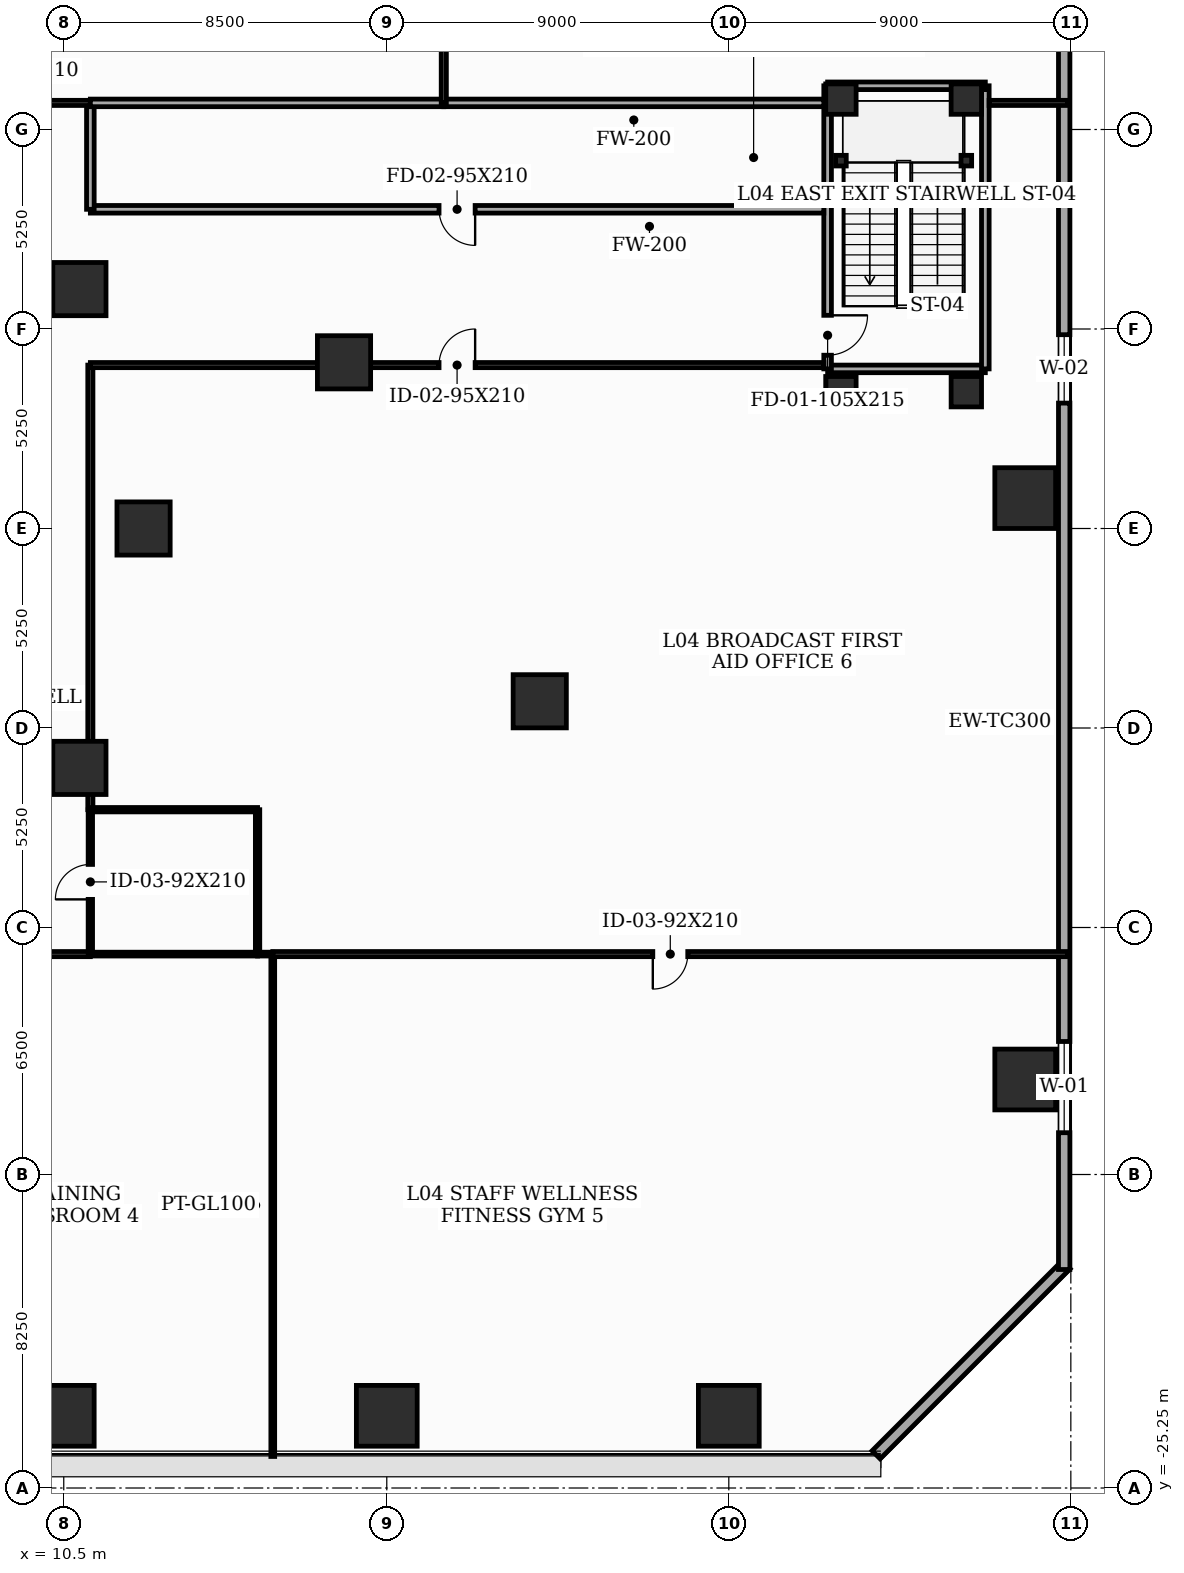
"""IFC4 building model, lengths in metres.
Left out: names, types, materials, properties, quantities, classifications, styles, units other than length and angle.
Written with IfcOpenShell. Run it as: python <this file> out.ifc"""

import sys

from ifc_helpers import new_model, si_unit, direction, frame, frame_2d, origin, origin_2d, place, context, subcontext, project, spatial, rectangle, i_section, extrude, element, fill, save


model = new_model("IFC4")
c1 = context("Model", 3, precision=1e-05, world=origin(), true_north=direction((0.0, 1.0)))
c2 = subcontext(c1, "Body", "Model", "MODEL_VIEW")
j1 = project(units=[si_unit("LENGTHUNIT", "METRE"), si_unit("PLANEANGLEUNIT", "RADIAN")], contexts=[c1])
p1 = place(None, origin())
s1 = spatial("IfcSite", under=j1, at=p1, CompositionType="ELEMENT")
p2 = place(p1, origin())
s2 = spatial("IfcBuilding", under=s1, at=p2, CompositionType="ELEMENT")
p3 = place(p2, frame((0.0, 0.0, 20.8)))
s3 = spatial("IfcBuildingStorey", under=s2, at=p3, CompositionType="ELEMENT", Elevation=20.8)
for number, where, z_axis, x_axis in (
    (1, (12.6, 0.0, 0.0), (0.0, 0.0, 1.0), (1.0, 0.0, 0.0)),
    (2, (10.912, 6.3, 0.0), (0.0, 0.0, 1.0), (1.0, 0.0, 0.0)),
    (3, (10.912, -6.3, 0.0), (0.0, 0.0, 1.0), (1.0, 0.0, 0.0)),
):
    element("IfcColumn", number, at=place(p3, frame(where, z_axis=z_axis, x_axis=x_axis)), inside=s3, PredefinedType="COLUMN", context=c2, shape_type="SweptSolid", body=[
        extrude(rectangle(XDim=1.4, YDim=1.4, at=origin_2d()), origin(), (0.0, 0.0, 1.0), 5.2),
    ])
for number, where, z_axis, x_axis in (
    (4, (10.5, -23.35, 0.0), (0.0, 0.0, 1.0), (1.0, 0.0, 0.0)),
    (5, (19.0, -23.35, 0.0), (0.0, 0.0, 1.0), (1.0, 0.0, 0.0)),
    (6, (28.0, -23.35, 0.0), (0.0, 0.0, 1.0), (1.0, 0.0, 0.0)),
    (7, (35.8, -14.5, 0.0), (0.0, 0.0, 1.0), (1.0, 0.0, 0.0)),
    (8, (35.8, 0.8, 0.0), (0.0, 0.0, 1.0), (1.0, 0.0, 0.0)),
):
    element("IfcColumn", number, at=place(p3, frame(where, z_axis=z_axis, x_axis=x_axis)), inside=s3, PredefinedType="COLUMN", context=c2, shape_type="SweptSolid", body=[
        extrude(rectangle(XDim=1.6, YDim=1.6, at=origin_2d()), origin(), (0.0, 0.0, 1.0), 5.2),
    ])
for number, where, z_axis, x_axis in (
    (9, (23.025, -4.547, 0.0), (0.0, 0.0, 1.0), (1.0, 0.0, 0.0)),
    (10, (17.875, 4.373, 0.0), (0.0, 0.0, 1.0), (1.0, 0.0, 0.0)),
):
    element("IfcColumn", number, at=place(p3, frame(where, z_axis=z_axis, x_axis=x_axis)), inside=s3, PredefinedType="COLUMN", context=c2, shape_type="SweptSolid", body=[
        extrude(rectangle(XDim=1.4, YDim=1.4, at=origin_2d()), origin(), (0.0, 0.0, 1.0), 5.2),
    ])
for number, where, z_axis, x_axis in (
    (11, (30.95, 3.6, 0.0), (0.0, 0.0, 1.0), (1.0, 0.0, 0.0)),
    (12, (34.25, 3.6, 0.0), (0.0, 0.0, 1.0), (1.0, 0.0, 0.0)),
    (13, (34.25, 11.3, 0.0), (0.0, 0.0, 1.0), (1.0, 0.0, 0.0)),
    (14, (30.95, 11.3, 0.0), (0.0, 0.0, 1.0), (1.0, 0.0, 0.0)),
):
    element("IfcColumn", number, at=place(p3, frame(where, z_axis=z_axis, x_axis=x_axis)), inside=s3, PredefinedType="COLUMN", context=c2, shape_type="SweptSolid", body=[
        extrude(rectangle(XDim=0.8, YDim=0.8, at=origin_2d()), origin(), (0.0, 0.0, 1.0), 5.2),
    ])
for number, where, z_axis, x_axis in (
    (15, (30.95, 9.68, 0.0), (0.0, 0.0, 1.0), (1.0, 0.0, 0.0)),
    (16, (34.25, 9.68, 0.0), (0.0, 0.0, 1.0), (1.0, 0.0, 0.0)),
):
    element("IfcColumn", number, at=place(p3, frame(where, z_axis=z_axis, x_axis=x_axis)), inside=s3, PredefinedType="PILASTER", context=c2, shape_type="SweptSolid", body=[
        extrude(i_section(OverallWidth=0.28, OverallDepth=0.28, WebThickness=0.01, FlangeThickness=0.018, at=origin_2d()), origin(), (0.0, 0.0, 1.0), 5.2),
    ])
p4 = place(p3, frame((31.876, -24.376, 0.0), z_axis=(0.0, 0.0, 1.0), x_axis=(0.707106781187, 0.707106781187, 0.0)))
e17 = element("IfcWall", 17, at=p4, inside=s3, PredefinedType="SOLIDWALL", context=c2, shape_type="SweptSolid", body=[
    extrude(rectangle(XDim=7.071, YDim=0.3, at=frame_2d((3.536, 0.0))), origin(), (0.0, 0.0, 1.0), 4.94),
])
p5 = place(p3, frame((36.825, -19.5, 0.0), z_axis=(0.0, 0.0, 1.0), x_axis=(0.0, 1.0, 0.0)))
e18 = element("IfcWall", 18, at=p5, inside=s3, PredefinedType="SOLIDWALL", context=c2, shape_type="SweptSolid", body=[
    extrude(rectangle(XDim=48.0, YDim=0.3, at=frame_2d((24.0, 0.0))), origin(), (0.0, 0.0, 1.0), 4.94),
])
p6 = place(p5, frame((3.6, 0.0, 0.9)))
e19 = element("IfcOpeningElement", 19, at=p6, cuts=e18, PredefinedType="OPENING", context=c2, shape_type="SweptSolid", body=[
    extrude(rectangle(XDim=2.4, YDim=1.35, at=frame_2d((1.2, 0.675))), frame((0.0, 0.16, 0.0), z_axis=(0.0, -1.0, 0.0), x_axis=(1.0, 0.0, 0.0)), (0.0, 0.0, 1.0), 0.32),
])
p7 = place(p5, frame((22.8, 0.0, 0.9)))
e20 = element("IfcOpeningElement", 20, at=p7, cuts=e18, PredefinedType="OPENING", context=c2, shape_type="SweptSolid", body=[
    extrude(rectangle(XDim=1.8, YDim=1.35, at=frame_2d((0.9, 0.675))), frame((0.0, 0.16, 0.0), z_axis=(0.0, -1.0, 0.0), x_axis=(1.0, 0.0, 0.0)), (0.0, 0.0, 1.0), 0.32),
])
p8 = place(p5, frame((33.8, 0.0, 0.9)))
e21 = element("IfcOpeningElement", 21, at=p8, cuts=e18, PredefinedType="OPENING", context=c2, shape_type="SweptSolid", body=[
    extrude(rectangle(XDim=2.4, YDim=1.35, at=frame_2d((1.2, 0.675))), frame((0.0, 0.16, 0.0), z_axis=(0.0, -1.0, 0.0), x_axis=(1.0, 0.0, 0.0)), (0.0, 0.0, 1.0), 0.32),
])
p9 = place(p3, frame((30.6, 4.2, 0.0), z_axis=(0.0, 0.0, 1.0), x_axis=(1.0, 0.0, 0.0)))
e22 = element("IfcWall", 22, at=p9, inside=s3, PredefinedType="SOLIDWALL", context=c2, shape_type="SweptSolid", body=[
    extrude(rectangle(XDim=4.15, YDim=0.2, at=frame_2d((2.075, 0.0))), origin(), (0.0, 0.0, 1.0), 4.94),
])
p10 = place(p3, frame((34.75, 4.2, 0.0), z_axis=(0.0, 0.0, 1.0), x_axis=(0.0, 1.0, 0.0)))
e23 = element("IfcWall", 23, at=p10, inside=s3, PredefinedType="SOLIDWALL", context=c2, shape_type="SweptSolid", body=[
    extrude(rectangle(XDim=7.45, YDim=0.2, at=frame_2d((3.725, 0.0))), origin(), (0.0, 0.0, 1.0), 4.94),
])
p11 = place(p3, frame((34.75, 11.65, 0.0), z_axis=(0.0, 0.0, 1.0), x_axis=(-1.0, 0.0, 0.0)))
e24 = element("IfcWall", 24, at=p11, inside=s3, PredefinedType="SOLIDWALL", context=c2, shape_type="SweptSolid", body=[
    extrude(rectangle(XDim=4.15, YDim=0.2, at=frame_2d((2.075, 0.0))), origin(), (0.0, 0.0, 1.0), 4.94),
])
p12 = place(p3, frame((30.6, 11.65, 0.0), z_axis=(0.0, 0.0, 1.0), x_axis=(0.0, -1.0, 0.0)))
e25 = element("IfcWall", 25, at=p12, inside=s3, PredefinedType="SOLIDWALL", context=c2, shape_type="SweptSolid", body=[
    extrude(rectangle(XDim=7.45, YDim=0.2, at=frame_2d((3.725, 0.0))), origin(), (0.0, 0.0, 1.0), 4.94),
])
p13 = place(p12, frame((6.04, 0.0, 0.0)))
e26 = element("IfcOpeningElement", 26, at=p13, cuts=e25, PredefinedType="OPENING", context=c2, shape_type="SweptSolid", body=[
    extrude(rectangle(XDim=1.05, YDim=2.15, at=frame_2d((0.525, 1.075))), frame((0.0, 0.11, 0.0), z_axis=(0.0, -1.0, 0.0), x_axis=(1.0, 0.0, 0.0)), (0.0, 0.0, 1.0), 0.22),
])
p14 = place(p3, frame((0.0, -11.2, 0.0), z_axis=(0.0, 0.0, 1.0), x_axis=(1.0, 0.0, 0.0)))
e27 = element("IfcWall", 27, at=p14, inside=s3, PredefinedType="PARTITIONING", context=c2, shape_type="SweptSolid", body=[
    extrude(rectangle(XDim=11.2, YDim=0.135, at=frame_2d((5.6, 0.0))), origin(), (0.0, 0.0, 1.0), 3.525),
])
p15 = place(p14, frame((2.336, 0.0, 0.0)))
e28 = element("IfcOpeningElement", 28, at=p15, cuts=e27, PredefinedType="OPENING", context=c2, shape_type="SweptSolid", body=[
    extrude(rectangle(XDim=1.6, YDim=2.15, at=frame_2d((0.8, 1.075))), frame((0.0, 0.077, 0.0), z_axis=(0.0, -1.0, 0.0), x_axis=(1.0, 0.0, 0.0)), (0.0, 0.0, 1.0), 0.155),
])
p16 = place(p3, frame((11.2, -11.2, 0.0), z_axis=(0.0, 0.0, 1.0), x_axis=(0.0, 1.0, 0.0)))
e29 = element("IfcWall", 29, at=p16, inside=s3, PredefinedType="PARTITIONING", context=c2, shape_type="SweptSolid", body=[
    extrude(rectangle(XDim=3.8, YDim=0.115, at=frame_2d((1.9, 0.0))), origin(), (0.0, 0.0, 1.0), 4.94),
])
p17 = place(p16, frame((1.44, 0.0, 0.0)))
e30 = element("IfcOpeningElement", 30, at=p17, cuts=e29, PredefinedType="OPENING", context=c2, shape_type="SweptSolid", body=[
    extrude(rectangle(XDim=0.92, YDim=2.1, at=frame_2d((0.46, 1.05))), frame((0.0, 0.067, 0.0), z_axis=(0.0, -1.0, 0.0), x_axis=(1.0, 0.0, 0.0)), (0.0, 0.0, 1.0), 0.135),
])
p18 = place(p3, frame((11.2, -7.4, 0.0), z_axis=(0.0, 0.0, 1.0), x_axis=(0.0, 1.0, 0.0)))
e31 = element("IfcWall", 31, at=p18, inside=s3, PredefinedType="PARTITIONING", context=c2, shape_type="SweptSolid", body=[
    extrude(rectangle(XDim=11.7, YDim=0.135, at=frame_2d((5.85, 0.0))), origin(), (0.0, 0.0, 1.0), 3.525),
])
p19 = place(p3, frame((11.2, 4.3, 0.0), z_axis=(0.0, 0.0, 1.0), x_axis=(1.0, 0.0, 0.0)))
e32 = element("IfcWall", 32, at=p19, inside=s3, PredefinedType="PARTITIONING", context=c2, shape_type="SweptSolid", body=[
    extrude(rectangle(XDim=19.3, YDim=0.135, at=frame_2d((9.65, 0.0))), origin(), (0.0, 0.0, 1.0), 3.525),
])
p20 = place(p19, frame((9.175, 0.0, 0.0)))
e33 = element("IfcOpeningElement", 33, at=p20, cuts=e32, PredefinedType="OPENING", context=c2, shape_type="SweptSolid", body=[
    extrude(rectangle(XDim=0.95, YDim=2.1, at=frame_2d((0.475, 1.05))), frame((0.0, 0.077, 0.0), z_axis=(0.0, -1.0, 0.0), x_axis=(1.0, 0.0, 0.0)), (0.0, 0.0, 1.0), 0.155),
])
p21 = place(p3, frame((30.5, 8.4, 0.0), z_axis=(0.0, 0.0, 1.0), x_axis=(-1.0, 0.0, 0.0)))
e34 = element("IfcWall", 34, at=p21, inside=s3, PredefinedType="SOLIDWALL", context=c2, shape_type="SweptSolid", body=[
    extrude(rectangle(XDim=19.3, YDim=0.2, at=frame_2d((9.65, 0.0))), origin(), (0.0, 0.0, 1.0), 3.525),
])
p22 = place(p21, frame((9.175, 0.0, 0.0)))
e35 = element("IfcOpeningElement", 35, at=p22, cuts=e34, PredefinedType="OPENING", context=c2, shape_type="SweptSolid", body=[
    extrude(rectangle(XDim=0.95, YDim=2.1, at=frame_2d((0.475, 1.05))), frame((0.0, 0.11, 0.0), z_axis=(0.0, -1.0, 0.0), x_axis=(1.0, 0.0, 0.0)), (0.0, 0.0, 1.0), 0.22),
])
p23 = place(p3, frame((11.2, 8.4, 0.0), z_axis=(0.0, 0.0, 1.0), x_axis=(0.0, 1.0, 0.0)))
e36 = element("IfcWall", 36, at=p23, inside=s3, PredefinedType="SOLIDWALL", context=c2, shape_type="SweptSolid", body=[
    extrude(rectangle(XDim=2.8, YDim=0.2, at=frame_2d((1.4, 0.0))), origin(), (0.0, 0.0, 1.0), 3.525),
])
p24 = place(p3, frame((11.2, 11.2, 0.0), z_axis=(0.0, 0.0, 1.0), x_axis=(-1.0, 0.0, 0.0)))
e37 = element("IfcWall", 37, at=p24, inside=s3, PredefinedType="PARTITIONING", context=c2, shape_type="SweptSolid", body=[
    extrude(rectangle(XDim=4.2, YDim=0.135, at=frame_2d((2.1, 0.0))), origin(), (0.0, 0.0, 1.0), 3.525),
])
p25 = place(p24, frame((1.625, 0.0, 0.0)))
e38 = element("IfcOpeningElement", 38, at=p25, cuts=e37, PredefinedType="OPENING", context=c2, shape_type="SweptSolid", body=[
    extrude(rectangle(XDim=0.95, YDim=2.1, at=frame_2d((0.475, 1.05))), frame((0.0, 0.077, 0.0), z_axis=(0.0, -1.0, 0.0), x_axis=(1.0, 0.0, 0.0)), (0.0, 0.0, 1.0), 0.155),
])
p26 = place(p3, frame((15.6, -11.2, 0.0), z_axis=(0.0, 0.0, 1.0), x_axis=(-1.0, 0.0, 0.0)))
e39 = element("IfcWall", 39, at=p26, inside=s3, PredefinedType="MOVABLE", context=c2, shape_type="SweptSolid", body=[
    extrude(rectangle(XDim=4.4, YDim=0.1, at=frame_2d((2.2, 0.0))), origin(), (0.0, 0.0, 1.0), 4.94),
])
p27 = place(p3, frame((16.0, -24.42, 0.0), z_axis=(0.0, 0.0, 1.0), x_axis=(0.0, 1.0, 0.0)))
e40 = element("IfcWall", 40, at=p27, inside=s3, PredefinedType="MOVABLE", context=c2, shape_type="SweptSolid", body=[
    extrude(rectangle(XDim=13.22, YDim=0.1, at=frame_2d((6.61, 0.0))), origin(), (0.0, 0.0, 1.0), 3.425),
])
p28 = place(p3, frame((16.0, -11.2, 0.0), z_axis=(0.0, 0.0, 1.0), x_axis=(-1.0, 0.0, 0.0)))
e41 = element("IfcWall", 41, at=p28, inside=s3, PredefinedType="MOVABLE", context=c2, shape_type="SweptSolid", body=[
    extrude(rectangle(XDim=0.4, YDim=0.1, at=frame_2d((0.2, 0.0))), origin(), (0.0, 0.0, 1.0), 4.94),
])
p29 = place(p3, frame((15.6, -11.2, 0.0), z_axis=(0.0, 0.0, 1.0), x_axis=(0.0, 1.0, 0.0)))
e42 = element("IfcWall", 42, at=p29, inside=s3, PredefinedType="PARTITIONING", context=c2, shape_type="SweptSolid", body=[
    extrude(rectangle(XDim=3.8, YDim=0.115, at=frame_2d((1.9, 0.0))), origin(), (0.0, 0.0, 1.0), 4.94),
])
p30 = place(p3, frame((15.6, -7.4, 0.0), z_axis=(0.0, 0.0, 1.0), x_axis=(-1.0, 0.0, 0.0)))
e43 = element("IfcWall", 43, at=p30, inside=s3, PredefinedType="PARTITIONING", context=c2, shape_type="SweptSolid", body=[
    extrude(rectangle(XDim=4.4, YDim=0.115, at=frame_2d((2.2, 0.0))), origin(), (0.0, 0.0, 1.0), 4.94),
])
p31 = place(p3, frame((36.92, -11.2, 0.0), z_axis=(0.0, 0.0, 1.0), x_axis=(-1.0, 0.0, 0.0)))
e44 = element("IfcWall", 44, at=p31, inside=s3, PredefinedType="PARTITIONING", context=c2, shape_type="SweptSolid", body=[
    extrude(rectangle(XDim=20.92, YDim=0.135, at=frame_2d((10.46, 0.0))), origin(), (0.0, 0.0, 1.0), 3.425),
])
p32 = place(p31, frame((10.0, 0.0, 0.0)))
e45 = element("IfcOpeningElement", 45, at=p32, cuts=e44, PredefinedType="OPENING", context=c2, shape_type="SweptSolid", body=[
    extrude(rectangle(XDim=0.92, YDim=2.1, at=frame_2d((0.46, 1.05))), frame((0.0, 0.077, 0.0), z_axis=(0.0, -1.0, 0.0), x_axis=(1.0, 0.0, 0.0)), (0.0, 0.0, 1.0), 0.155),
])
p33 = place(p3, frame((36.92, 11.2, 0.0), z_axis=(0.0, 0.0, 1.0), x_axis=(-1.0, 0.0, 0.0)))
e46 = element("IfcWall", 46, at=p33, inside=s3, PredefinedType="PARTITIONING", context=c2, shape_type="SweptSolid", body=[
    extrude(rectangle(XDim=2.07, YDim=0.135, at=frame_2d((1.035, 0.0))), origin(), (0.0, 0.0, 1.0), 3.425),
])
p34 = place(p3, frame((30.5, 11.2, 0.0), z_axis=(0.0, 0.0, 1.0), x_axis=(-1.0, 0.0, 0.0)))
e47 = element("IfcWall", 47, at=p34, inside=s3, PredefinedType="SOLIDWALL", context=c2, shape_type="SweptSolid", body=[
    extrude(rectangle(XDim=10.0, YDim=0.2, at=frame_2d((5.0, 0.0))), origin(), (0.0, 0.0, 1.0), 4.94),
])
p35 = place(p3, frame((20.5, 11.2, 0.0), z_axis=(0.0, 0.0, 1.0), x_axis=(-1.0, 0.0, 0.0)))
e48 = element("IfcWall", 48, at=p35, inside=s3, PredefinedType="SOLIDWALL", context=c2, shape_type="SweptSolid", body=[
    extrude(rectangle(XDim=9.3, YDim=0.2, at=frame_2d((4.65, 0.0))), origin(), (0.0, 0.0, 1.0), 3.525),
])
p36 = place(p3, frame((20.5, 33.42, 0.0), z_axis=(0.0, 0.0, 1.0), x_axis=(0.0, -1.0, 0.0)))
e49 = element("IfcWall", 49, at=p36, inside=s3, PredefinedType="PARTITIONING", context=c2, shape_type="SweptSolid", body=[
    extrude(rectangle(XDim=22.22, YDim=0.135, at=frame_2d((11.11, 0.0))), origin(), (0.0, 0.0, 1.0), 3.425),
])
p37 = place(p36, frame((10.3, 0.0, 0.0)))
e50 = element("IfcOpeningElement", 50, at=p37, cuts=e49, PredefinedType="OPENING", context=c2, shape_type="SweptSolid", body=[
    extrude(rectangle(XDim=0.92, YDim=2.1, at=frame_2d((0.46, 1.05))), frame((0.0, 0.077, 0.0), z_axis=(0.0, -1.0, 0.0), x_axis=(1.0, 0.0, 0.0)), (0.0, 0.0, 1.0), 0.155),
])
p38 = place(p6, origin())
e51 = element("IfcWindow", 51, at=p38, inside=s3, PartitioningType="SINGLE_PANEL", PredefinedType="WINDOW", context=c2, shape_type="SweptSolid", body=[
    extrude(rectangle(XDim=2.4, YDim=1.35, at=frame_2d((1.2, 0.675))), frame((0.0, 0.03, 0.0), z_axis=(0.0, -1.0, 0.0), x_axis=(1.0, 0.0, 0.0)), (0.0, 0.0, 1.0), 0.06),
])
fill(e19, e51)
p39 = place(p7, origin())
e52 = element("IfcWindow", 52, at=p39, inside=s3, PartitioningType="SINGLE_PANEL", PredefinedType="WINDOW", context=c2, shape_type="SweptSolid", body=[
    extrude(rectangle(XDim=1.8, YDim=1.35, at=frame_2d((0.9, 0.675))), frame((0.0, 0.03, 0.0), z_axis=(0.0, -1.0, 0.0), x_axis=(1.0, 0.0, 0.0)), (0.0, 0.0, 1.0), 0.06),
])
fill(e20, e52)
p40 = place(p13, origin())
e53 = element("IfcDoor", 53, at=p40, inside=s3, OperationType="SINGLE_SWING_LEFT", PredefinedType="DOOR", context=c2, shape_type="SweptSolid", body=[
    extrude(rectangle(XDim=1.05, YDim=2.15, at=frame_2d((0.525, 1.075))), frame((0.0, 0.025, 0.0), z_axis=(0.0, -1.0, 0.0), x_axis=(1.0, 0.0, 0.0)), (0.0, 0.0, 1.0), 0.05),
])
fill(e26, e53)
p41 = place(p17, origin())
e54 = element("IfcDoor", 54, at=p41, inside=s3, OperationType="SINGLE_SWING_LEFT", PredefinedType="DOOR", context=c2, shape_type="SweptSolid", body=[
    extrude(rectangle(XDim=0.92, YDim=2.1, at=frame_2d((0.46, 1.05))), frame((0.0, 0.025, 0.0), z_axis=(0.0, -1.0, 0.0), x_axis=(1.0, 0.0, 0.0)), (0.0, 0.0, 1.0), 0.05),
])
fill(e30, e54)
p42 = place(p20, origin())
e55 = element("IfcDoor", 55, at=p42, inside=s3, OperationType="SINGLE_SWING_RIGHT", PredefinedType="DOOR", context=c2, shape_type="SweptSolid", body=[
    extrude(rectangle(XDim=0.95, YDim=2.1, at=frame_2d((0.475, 1.05))), frame((0.0, 0.025, 0.0), z_axis=(0.0, -1.0, 0.0), x_axis=(1.0, 0.0, 0.0)), (0.0, 0.0, 1.0), 0.05),
])
fill(e33, e55)
p43 = place(p22, origin())
e56 = element("IfcDoor", 56, at=p43, inside=s3, OperationType="SINGLE_SWING_LEFT", PredefinedType="DOOR", context=c2, shape_type="SweptSolid", body=[
    extrude(rectangle(XDim=0.95, YDim=2.1, at=frame_2d((0.475, 1.05))), frame((0.0, 0.025, 0.0), z_axis=(0.0, -1.0, 0.0), x_axis=(1.0, 0.0, 0.0)), (0.0, 0.0, 1.0), 0.05),
])
fill(e35, e56)
p44 = place(p32, origin())
e57 = element("IfcDoor", 57, at=p44, inside=s3, OperationType="SINGLE_SWING_RIGHT", PredefinedType="DOOR", context=c2, shape_type="SweptSolid", body=[
    extrude(rectangle(XDim=0.92, YDim=2.1, at=frame_2d((0.46, 1.05))), frame((0.0, 0.025, 0.0), z_axis=(0.0, -1.0, 0.0), x_axis=(1.0, 0.0, 0.0)), (0.0, 0.0, 1.0), 0.05),
])
fill(e45, e57)
save(model, sys.argv[1])
